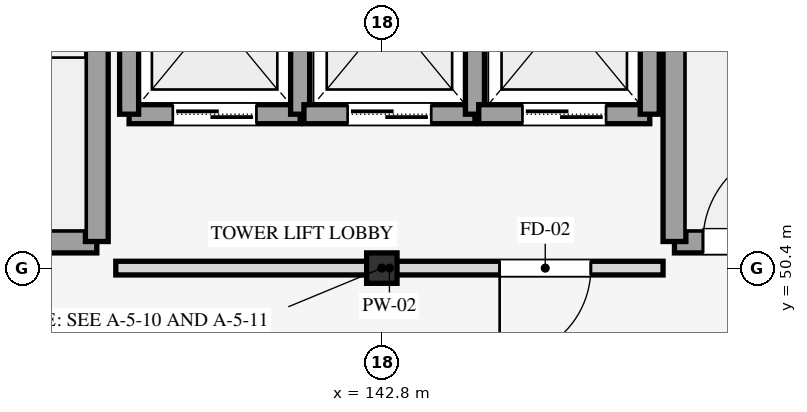
"""IFC4 building model, lengths in metres.
Left out: names, types, materials, properties, quantities, classifications, styles, units other than length and angle.
Written with IfcOpenShell. Run it as: python <this file> out.ifc"""

import sys

from ifc_helpers import new_model, si_unit, direction, frame, frame_2d, origin, origin_2d, place, context, subcontext, project, spatial, rectangle, i_section, extrude, element, fill, save


model = new_model("IFC4")
c1 = context("Model", 3, precision=1e-05, world=origin(), true_north=direction((0.0, 1.0)))
c2 = subcontext(c1, "Body", "Model", "MODEL_VIEW")
j1 = project(units=[si_unit("LENGTHUNIT", "METRE"), si_unit("PLANEANGLEUNIT", "RADIAN")], contexts=[c1])
p1 = place(None, origin())
s1 = spatial("IfcSite", under=j1, at=p1, CompositionType="ELEMENT")
p2 = place(p1, origin())
s2 = spatial("IfcBuilding", under=s1, at=p2, CompositionType="ELEMENT")
p3 = place(p2, frame((0.0, 0.0, 14.4)))
s3 = spatial("IfcBuildingStorey", under=s2, at=p3, CompositionType="ELEMENT", Elevation=14.4)
p4 = place(p3, frame((142.8, 50.4, 0.0), z_axis=(0.0, 0.0, 1.0), x_axis=(1.0, 0.0, 0.0)))
e1 = element("IfcColumn", 1, at=p4, inside=s3, PredefinedType="COLUMN", context=c2, shape_type="SweptSolid", body=[
    extrude(i_section(OverallWidth=0.4, OverallDepth=0.4, WebThickness=0.013, FlangeThickness=0.021, FilletRadius=0.022, at=origin_2d()), origin(), (0.0, 0.0, 1.0), 4.5),
])
p5 = place(p3, frame((135.05, 50.75, 0.0), z_axis=(0.0, 0.0, 1.0), x_axis=(1.0, 0.0, 0.0)))
e2 = element("IfcWall", 2, at=p5, inside=s3, PredefinedType="SHEAR", context=c2, shape_type="SweptSolid", body=[
    extrude(rectangle(XDim=4.0, YDim=0.3, at=frame_2d((2.0, 0.0))), origin(), (0.0, 0.0, 1.0), 4.5),
])
p6 = place(p5, frame((0.375, 0.0, 0.0)))
e3 = element("IfcOpeningElement", 3, at=p6, cuts=e2, PredefinedType="OPENING", context=c2, shape_type="SweptSolid", body=[
    extrude(rectangle(XDim=1.25, YDim=2.15, at=frame_2d((0.625, 1.075))), frame((0.0, 0.16, 0.0), z_axis=(0.0, -1.0, 0.0), x_axis=(1.0, 0.0, 0.0)), (0.0, 0.0, 1.0), 0.32),
])
p7 = place(p3, frame((139.05, 50.75, 0.0), z_axis=(0.0, 0.0, 1.0), x_axis=(0.0, 1.0, 0.0)))
e4 = element("IfcWall", 4, at=p7, inside=s3, PredefinedType="SHEAR", context=c2, shape_type="SweptSolid", body=[
    extrude(rectangle(XDim=14.3, YDim=0.3, at=frame_2d((7.15, 0.0))), origin(), (0.0, 0.0, 1.0), 4.5),
])
p8 = place(p3, frame((146.65, 50.75, 0.0), z_axis=(0.0, 0.0, 1.0), x_axis=(1.0, 0.0, 0.0)))
e5 = element("IfcWall", 5, at=p8, inside=s3, PredefinedType="SHEAR", context=c2, shape_type="SweptSolid", body=[
    extrude(rectangle(XDim=4.0, YDim=0.3, at=frame_2d((2.0, 0.0))), origin(), (0.0, 0.0, 1.0), 4.5),
])
p9 = place(p8, frame((0.375, 0.0, 0.0)))
e6 = element("IfcOpeningElement", 6, at=p9, cuts=e5, PredefinedType="OPENING", context=c2, shape_type="SweptSolid", body=[
    extrude(rectangle(XDim=1.25, YDim=2.15, at=frame_2d((0.625, 1.075))), frame((0.0, 0.16, 0.0), z_axis=(0.0, -1.0, 0.0), x_axis=(1.0, 0.0, 0.0)), (0.0, 0.0, 1.0), 0.32),
])
p10 = place(p3, frame((146.65, 50.75, 0.0), z_axis=(0.0, 0.0, 1.0), x_axis=(0.0, 1.0, 0.0)))
e7 = element("IfcWall", 7, at=p10, inside=s3, PredefinedType="SHEAR", context=c2, shape_type="SweptSolid", body=[
    extrude(rectangle(XDim=14.3, YDim=0.3, at=frame_2d((7.15, 0.0))), origin(), (0.0, 0.0, 1.0), 4.5),
])
p11 = place(p3, frame((139.475, 52.425, 0.0), z_axis=(0.0, 0.0, 1.0), x_axis=(1.0, 0.0, 0.0)))
e8 = element("IfcWall", 8, at=p11, inside=s3, PredefinedType="SHEAR", context=c2, shape_type="SweptSolid", body=[
    extrude(rectangle(XDim=2.25, YDim=0.25, at=frame_2d((1.125, 0.0))), origin(), (0.0, 0.0, 1.0), 4.24),
])
p12 = place(p11, frame((0.575, 0.0, 0.0)))
e9 = element("IfcOpeningElement", 9, at=p12, cuts=e8, PredefinedType="OPENING", context=c2, shape_type="SweptSolid", body=[
    extrude(rectangle(XDim=1.1, YDim=2.15, at=frame_2d((0.55, 1.075))), frame((0.0, 0.135, 0.0), z_axis=(0.0, -1.0, 0.0), x_axis=(1.0, 0.0, 0.0)), (0.0, 0.0, 1.0), 0.27),
])
for number, where, z_axis, x_axis in (
    (10, (139.475, 52.425, 0.0), (0.0, 0.0, 1.0), (0.0, 1.0, 0.0)),
    (11, (141.725, 52.425, 0.0), (0.0, 0.0, 1.0), (0.0, 1.0, 0.0)),
):
    element("IfcWall", number, at=place(p3, frame(where, z_axis=z_axis, x_axis=x_axis)), inside=s3, PredefinedType="SHEAR", context=c2, shape_type="SweptSolid", body=[
        extrude(rectangle(XDim=2.65, YDim=0.25, at=frame_2d((1.325, 0.0))), origin(), (0.0, 0.0, 1.0), 4.24),
    ])
p13 = place(p3, frame((141.775, 52.425, 0.0), z_axis=(0.0, 0.0, 1.0), x_axis=(1.0, 0.0, 0.0)))
e12 = element("IfcWall", 12, at=p13, inside=s3, PredefinedType="SHEAR", context=c2, shape_type="SweptSolid", body=[
    extrude(rectangle(XDim=2.25, YDim=0.25, at=frame_2d((1.125, 0.0))), origin(), (0.0, 0.0, 1.0), 4.24),
])
p14 = place(p13, frame((0.575, 0.0, 0.0)))
e13 = element("IfcOpeningElement", 13, at=p14, cuts=e12, PredefinedType="OPENING", context=c2, shape_type="SweptSolid", body=[
    extrude(rectangle(XDim=1.1, YDim=2.15, at=frame_2d((0.55, 1.075))), frame((0.0, 0.135, 0.0), z_axis=(0.0, -1.0, 0.0), x_axis=(1.0, 0.0, 0.0)), (0.0, 0.0, 1.0), 0.27),
])
p15 = place(p3, frame((144.025, 52.425, 0.0), z_axis=(0.0, 0.0, 1.0), x_axis=(0.0, 1.0, 0.0)))
e14 = element("IfcWall", 14, at=p15, inside=s3, PredefinedType="SHEAR", context=c2, shape_type="SweptSolid", body=[
    extrude(rectangle(XDim=2.65, YDim=0.25, at=frame_2d((1.325, 0.0))), origin(), (0.0, 0.0, 1.0), 4.24),
])
p16 = place(p3, frame((144.075, 52.425, 0.0), z_axis=(0.0, 0.0, 1.0), x_axis=(1.0, 0.0, 0.0)))
e15 = element("IfcWall", 15, at=p16, inside=s3, PredefinedType="SHEAR", context=c2, shape_type="SweptSolid", body=[
    extrude(rectangle(XDim=2.25, YDim=0.25, at=frame_2d((1.125, 0.0))), origin(), (0.0, 0.0, 1.0), 4.24),
])
p17 = place(p16, frame((0.575, 0.0, 0.0)))
e16 = element("IfcOpeningElement", 16, at=p17, cuts=e15, PredefinedType="OPENING", context=c2, shape_type="SweptSolid", body=[
    extrude(rectangle(XDim=1.1, YDim=2.15, at=frame_2d((0.55, 1.075))), frame((0.0, 0.135, 0.0), z_axis=(0.0, -1.0, 0.0), x_axis=(1.0, 0.0, 0.0)), (0.0, 0.0, 1.0), 0.27),
])
p18 = place(p3, frame((146.325, 52.425, 0.0), z_axis=(0.0, 0.0, 1.0), x_axis=(0.0, 1.0, 0.0)))
e17 = element("IfcWall", 17, at=p18, inside=s3, PredefinedType="SHEAR", context=c2, shape_type="SweptSolid", body=[
    extrude(rectangle(XDim=2.65, YDim=0.25, at=frame_2d((1.325, 0.0))), origin(), (0.0, 0.0, 1.0), 4.24),
])
p19 = place(p3, frame((139.3, 50.4, 0.0), z_axis=(0.0, 0.0, 1.0), x_axis=(1.0, 0.0, 0.0)))
e18 = element("IfcWall", 18, at=p19, inside=s3, PredefinedType="PARTITIONING", context=c2, shape_type="SweptSolid", body=[
    extrude(rectangle(XDim=7.2, YDim=0.18, at=frame_2d((3.6, 0.0))), origin(), (0.0, 0.0, 1.0), 3.54),
])
p20 = place(p19, frame((5.05, 0.0, 0.0)))
e19 = element("IfcOpeningElement", 19, at=p20, cuts=e18, PredefinedType="OPENING", context=c2, shape_type="SweptSolid", body=[
    extrude(rectangle(XDim=1.2, YDim=2.15, at=frame_2d((0.6, 1.075))), frame((0.0, 0.1, 0.0), z_axis=(0.0, -1.0, 0.0), x_axis=(1.0, 0.0, 0.0)), (0.0, 0.0, 1.0), 0.2),
])
p21 = place(p9, origin())
e20 = element("IfcDoor", 20, at=p21, inside=s3, OperationType="SINGLE_SWING_RIGHT", PredefinedType="DOOR", context=c2, shape_type="SweptSolid", body=[
    extrude(rectangle(XDim=1.25, YDim=2.15, at=frame_2d((0.625, 1.075))), frame((0.0, 0.025, 0.0), z_axis=(0.0, -1.0, 0.0), x_axis=(1.0, 0.0, 0.0)), (0.0, 0.0, 1.0), 0.05),
])
fill(e6, e20)
p22 = place(p12, origin())
e21 = element("IfcDoor", 21, at=p22, inside=s3, OperationType="DOUBLE_DOOR_SLIDING", PredefinedType="DOOR", context=c2, shape_type="SweptSolid", body=[
    extrude(rectangle(XDim=1.1, YDim=2.15, at=frame_2d((0.55, 1.075))), frame((0.0, 0.025, 0.0), z_axis=(0.0, -1.0, 0.0), x_axis=(1.0, 0.0, 0.0)), (0.0, 0.0, 1.0), 0.05),
])
fill(e9, e21)
p23 = place(p14, origin())
e22 = element("IfcDoor", 22, at=p23, inside=s3, OperationType="DOUBLE_DOOR_SLIDING", PredefinedType="DOOR", context=c2, shape_type="SweptSolid", body=[
    extrude(rectangle(XDim=1.1, YDim=2.15, at=frame_2d((0.55, 1.075))), frame((0.0, 0.025, 0.0), z_axis=(0.0, -1.0, 0.0), x_axis=(1.0, 0.0, 0.0)), (0.0, 0.0, 1.0), 0.05),
])
fill(e13, e22)
p24 = place(p17, origin())
e23 = element("IfcDoor", 23, at=p24, inside=s3, OperationType="DOUBLE_DOOR_SLIDING", PredefinedType="DOOR", context=c2, shape_type="SweptSolid", body=[
    extrude(rectangle(XDim=1.1, YDim=2.15, at=frame_2d((0.55, 1.075))), frame((0.0, 0.025, 0.0), z_axis=(0.0, -1.0, 0.0), x_axis=(1.0, 0.0, 0.0)), (0.0, 0.0, 1.0), 0.05),
])
fill(e16, e23)
p25 = place(p20, frame((1.2, 0.0, 0.0), z_axis=(0.0, 0.0, 1.0), x_axis=(-1.0, 0.0, 0.0)))
e24 = element("IfcDoor", 24, at=p25, inside=s3, OperationType="SINGLE_SWING_RIGHT", PredefinedType="DOOR", context=c2, shape_type="SweptSolid", body=[
    extrude(rectangle(XDim=1.2, YDim=2.15, at=frame_2d((0.6, 1.075))), frame((0.0, 0.025, 0.0), z_axis=(0.0, -1.0, 0.0), x_axis=(1.0, 0.0, 0.0)), (0.0, 0.0, 1.0), 0.05),
])
fill(e19, e24)
save(model, sys.argv[1])
